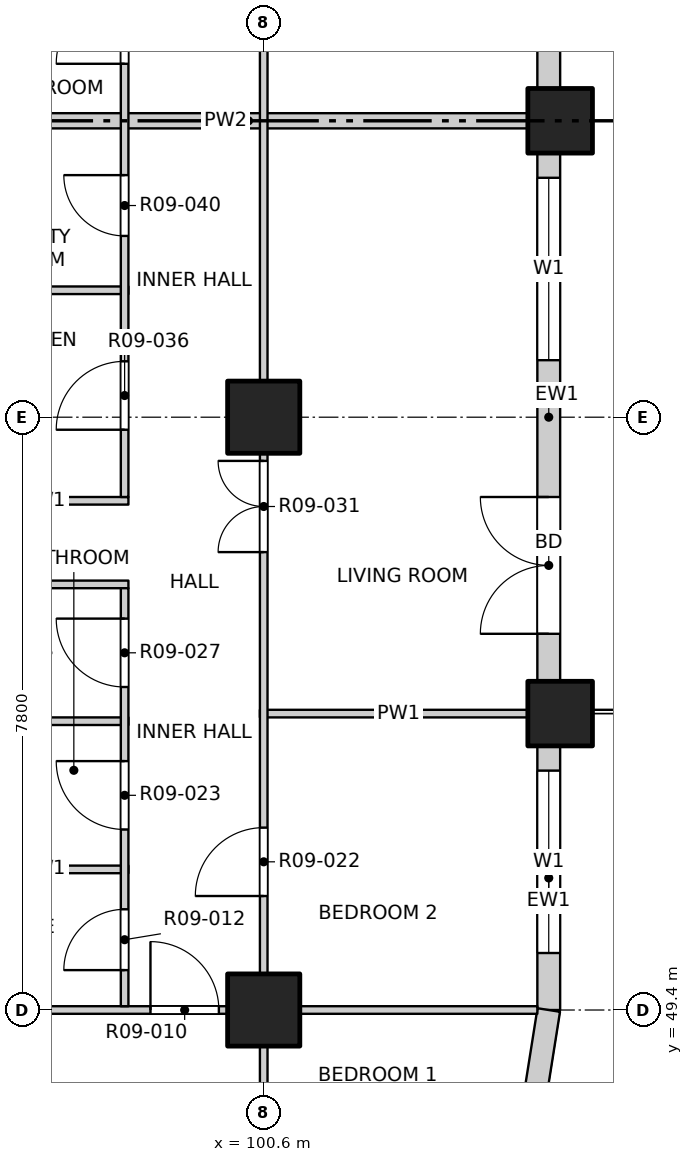
"""IFC4 building model, lengths in metres.
Left out: names, types, materials, properties, quantities, classifications, styles, units other than length and angle.
Written with IfcOpenShell. Run it as: python <this file> out.ifc"""

import sys

from ifc_helpers import new_model, si_unit, direction, frame, frame_2d, origin, origin_2d, place, context, subcontext, project, spatial, rectangle, extrude, element, fill, save


model = new_model("IFC4")
c1 = context("Model", 3, precision=1e-05, world=origin(), true_north=direction((0.0, 1.0)))
c2 = subcontext(c1, "Body", "Model", "MODEL_VIEW")
j1 = project(units=[si_unit("LENGTHUNIT", "METRE"), si_unit("PLANEANGLEUNIT", "RADIAN")], contexts=[c1])
p1 = place(None, origin())
s1 = spatial("IfcSite", under=j1, at=p1, CompositionType="ELEMENT")
p2 = place(p1, origin())
s2 = spatial("IfcBuilding", under=s1, at=p2, CompositionType="ELEMENT")
p3 = place(p2, frame((0.0, 0.0, 113.5)))
s3 = spatial("IfcBuildingStorey", under=s2, at=p3, CompositionType="ELEMENT", Elevation=113.5)
for number, where, z_axis, x_axis in (
    (1, (104.5, 53.3, -0.25), (0.0, 0.0, 1.0), (1.0, 0.0, 0.0)),
    (2, (104.5, 61.1, -0.25), (0.0, 0.0, 1.0), (1.0, 0.0, 0.0)),
):
    element("IfcColumn", number, at=place(p3, frame(where, z_axis=z_axis, x_axis=x_axis)), inside=s3, PredefinedType="COLUMN", context=c2, shape_type="SweptSolid", body=[
        extrude(rectangle(XDim=0.85, YDim=0.85, at=origin_2d()), origin(), (0.0, 0.0, 1.0), 3.35),
    ])
for number, where, z_axis, x_axis in (
    (3, (100.6, 49.4, -0.25), (0.0, 0.0, 1.0), (1.0, 0.0, 0.0)),
    (4, (100.6, 57.2, -0.25), (0.0, 0.0, 1.0), (1.0, 0.0, 0.0)),
):
    element("IfcColumn", number, at=place(p3, frame(where, z_axis=z_axis, x_axis=x_axis)), inside=s3, PredefinedType="COLUMN", context=c2, shape_type="SweptSolid", body=[
        extrude(rectangle(XDim=0.95, YDim=0.95, at=origin_2d()), origin(), (0.0, 0.0, 1.0), 3.35),
    ])
p4 = place(p3, frame((104.35, 49.4, 0.0), z_axis=(0.0, 0.0, 1.0), x_axis=(0.0, 1.0, 0.0)))
e5 = element("IfcWall", 5, at=p4, inside=s3, PredefinedType="SOLIDWALL", context=c2, shape_type="SweptSolid", body=[
    extrude(rectangle(XDim=3.475, YDim=0.3, at=frame_2d((1.738, 0.0))), origin(), (0.0, 0.0, 1.0), 3.1),
])
p5 = place(p4, frame((0.75, 0.0, 0.9)))
e6 = element("IfcOpeningElement", 6, at=p5, cuts=e5, PredefinedType="OPENING", context=c2, shape_type="SweptSolid", body=[
    extrude(rectangle(XDim=2.4, YDim=1.8, at=frame_2d((1.2, 0.9))), frame((0.0, 0.16, 0.0), z_axis=(0.0, -1.0, 0.0), x_axis=(1.0, 0.0, 0.0)), (0.0, 0.0, 1.0), 0.32),
])
p6 = place(p3, frame((104.35, 53.725, 0.0), z_axis=(0.0, 0.0, 1.0), x_axis=(0.0, 1.0, 0.0)))
e7 = element("IfcWall", 7, at=p6, inside=s3, PredefinedType="SOLIDWALL", context=c2, shape_type="SweptSolid", body=[
    extrude(rectangle(XDim=6.95, YDim=0.3, at=frame_2d((3.475, 0.0))), origin(), (0.0, 0.0, 1.0), 3.1),
])
p7 = place(p6, frame((0.625, 0.0, 0.0)))
e8 = element("IfcOpeningElement", 8, at=p7, cuts=e7, PredefinedType="OPENING", context=c2, shape_type="SweptSolid", body=[
    extrude(rectangle(XDim=1.8, YDim=2.4, at=frame_2d((0.9, 1.2))), frame((0.0, 0.16, 0.0), z_axis=(0.0, -1.0, 0.0), x_axis=(1.0, 0.0, 0.0)), (0.0, 0.0, 1.0), 0.32),
])
p8 = place(p6, frame((4.225, 0.0, 0.9)))
e9 = element("IfcOpeningElement", 9, at=p8, cuts=e7, PredefinedType="OPENING", context=c2, shape_type="SweptSolid", body=[
    extrude(rectangle(XDim=2.4, YDim=1.8, at=frame_2d((1.2, 0.9))), frame((0.0, 0.16, 0.0), z_axis=(0.0, -1.0, 0.0), x_axis=(1.0, 0.0, 0.0)), (0.0, 0.0, 1.0), 0.32),
])
p9 = place(p3, frame((104.35, 61.525, 0.0), z_axis=(0.0, 0.0, 1.0), x_axis=(0.0, 1.0, 0.0)))
e10 = element("IfcWall", 10, at=p9, inside=s3, PredefinedType="SOLIDWALL", context=c2, shape_type="SweptSolid", body=[
    extrude(rectangle(XDim=6.95, YDim=0.3, at=frame_2d((3.475, 0.0))), origin(), (0.0, 0.0, 1.0), 3.1),
])
p10 = place(p9, frame((0.625, 0.0, 0.0)))
e11 = element("IfcOpeningElement", 11, at=p10, cuts=e10, PredefinedType="OPENING", context=c2, shape_type="SweptSolid", body=[
    extrude(rectangle(XDim=1.8, YDim=2.4, at=frame_2d((0.9, 1.2))), frame((0.0, 0.16, 0.0), z_axis=(0.0, -1.0, 0.0), x_axis=(1.0, 0.0, 0.0)), (0.0, 0.0, 1.0), 0.32),
])
p11 = place(p9, frame((4.225, 0.0, 0.9)))
e12 = element("IfcOpeningElement", 12, at=p11, cuts=e10, PredefinedType="OPENING", context=c2, shape_type="SweptSolid", body=[
    extrude(rectangle(XDim=2.4, YDim=1.8, at=frame_2d((1.2, 0.9))), frame((0.0, 0.16, 0.0), z_axis=(0.0, -1.0, 0.0), x_axis=(1.0, 0.0, 0.0)), (0.0, 0.0, 1.0), 0.32),
])
p12 = place(p3, frame((104.167, 48.241, 0.0), z_axis=(0.0, 0.0, 1.0), x_axis=(0.156496880861, 0.987678452879, 0.0)))
e13 = element("IfcWall", 13, at=p12, inside=s3, PredefinedType="SOLIDWALL", context=c2, shape_type="SweptSolid", body=[
    extrude(rectangle(XDim=1.173, YDim=0.3, at=frame_2d((0.586, 0.0))), origin(), (0.0, 0.0, 1.0), 3.1),
])
p13 = place(p3, frame((65.8, 49.4, 0.0), z_axis=(0.0, 0.0, 1.0), x_axis=(1.0, 0.0, 0.0)))
e14 = element("IfcWall", 14, at=p13, inside=s3, PredefinedType="PARTITIONING", context=c2, shape_type="SweptSolid", body=[
    extrude(rectangle(XDim=38.4, YDim=0.1, at=frame_2d((19.2, 0.0))), origin(), (0.0, 0.0, 1.0), 3.1),
])
p14 = place(p13, frame((4.19, 0.0, 0.0)))
e15 = element("IfcOpeningElement", 15, at=p14, cuts=e14, PredefinedType="OPENING", context=c2, shape_type="SweptSolid", body=[
    extrude(rectangle(XDim=0.9, YDim=2.1, at=frame_2d((0.45, 1.05))), frame((0.0, 0.06, 0.0), z_axis=(0.0, -1.0, 0.0), x_axis=(1.0, 0.0, 0.0)), (0.0, 0.0, 1.0), 0.12),
])
p15 = place(p13, frame((9.0, 0.0, 0.0)))
e16 = element("IfcOpeningElement", 16, at=p15, cuts=e14, PredefinedType="OPENING", context=c2, shape_type="SweptSolid", body=[
    extrude(rectangle(XDim=0.9, YDim=2.1, at=frame_2d((0.45, 1.05))), frame((0.0, 0.06, 0.0), z_axis=(0.0, -1.0, 0.0), x_axis=(1.0, 0.0, 0.0)), (0.0, 0.0, 1.0), 0.12),
])
p16 = place(p13, frame((12.9, 0.0, 0.0)))
e17 = element("IfcOpeningElement", 17, at=p16, cuts=e14, PredefinedType="OPENING", context=c2, shape_type="SweptSolid", body=[
    extrude(rectangle(XDim=0.9, YDim=2.1, at=frame_2d((0.45, 1.05))), frame((0.0, 0.06, 0.0), z_axis=(0.0, -1.0, 0.0), x_axis=(1.0, 0.0, 0.0)), (0.0, 0.0, 1.0), 0.12),
])
p17 = place(p13, frame((16.8, 0.0, 0.0)))
e18 = element("IfcOpeningElement", 18, at=p17, cuts=e14, PredefinedType="OPENING", context=c2, shape_type="SweptSolid", body=[
    extrude(rectangle(XDim=0.9, YDim=2.1, at=frame_2d((0.45, 1.05))), frame((0.0, 0.06, 0.0), z_axis=(0.0, -1.0, 0.0), x_axis=(1.0, 0.0, 0.0)), (0.0, 0.0, 1.0), 0.12),
])
p18 = place(p13, frame((20.7, 0.0, 0.0)))
e19 = element("IfcOpeningElement", 19, at=p18, cuts=e14, PredefinedType="OPENING", context=c2, shape_type="SweptSolid", body=[
    extrude(rectangle(XDim=0.9, YDim=2.1, at=frame_2d((0.45, 1.05))), frame((0.0, 0.06, 0.0), z_axis=(0.0, -1.0, 0.0), x_axis=(1.0, 0.0, 0.0)), (0.0, 0.0, 1.0), 0.12),
])
p19 = place(p13, frame((24.6, 0.0, 0.0)))
e20 = element("IfcOpeningElement", 20, at=p19, cuts=e14, PredefinedType="OPENING", context=c2, shape_type="SweptSolid", body=[
    extrude(rectangle(XDim=0.9, YDim=2.1, at=frame_2d((0.45, 1.05))), frame((0.0, 0.06, 0.0), z_axis=(0.0, -1.0, 0.0), x_axis=(1.0, 0.0, 0.0)), (0.0, 0.0, 1.0), 0.12),
])
p20 = place(p13, frame((28.5, 0.0, 0.0)))
e21 = element("IfcOpeningElement", 21, at=p20, cuts=e14, PredefinedType="OPENING", context=c2, shape_type="SweptSolid", body=[
    extrude(rectangle(XDim=0.9, YDim=2.1, at=frame_2d((0.45, 1.05))), frame((0.0, 0.06, 0.0), z_axis=(0.0, -1.0, 0.0), x_axis=(1.0, 0.0, 0.0)), (0.0, 0.0, 1.0), 0.12),
])
p21 = place(p13, frame((33.31, 0.0, 0.0)))
e22 = element("IfcOpeningElement", 22, at=p21, cuts=e14, PredefinedType="OPENING", context=c2, shape_type="SweptSolid", body=[
    extrude(rectangle(XDim=0.9, YDim=2.1, at=frame_2d((0.45, 1.05))), frame((0.0, 0.06, 0.0), z_axis=(0.0, -1.0, 0.0), x_axis=(1.0, 0.0, 0.0)), (0.0, 0.0, 1.0), 0.12),
])
p22 = place(p3, frame((96.6, 51.25, 0.0), z_axis=(0.0, 0.0, 1.0), x_axis=(1.0, 0.0, 0.0)))
e23 = element("IfcWall", 23, at=p22, inside=s3, PredefinedType="PARTITIONING", context=c2, shape_type="SweptSolid", body=[
    extrude(rectangle(XDim=2.22, YDim=0.1, at=frame_2d((1.11, 0.0))), origin(), (0.0, 0.0, 1.0), 3.1),
])
p23 = place(p3, frame((96.8, 53.2, 0.0), z_axis=(0.0, 0.0, 1.0), x_axis=(1.0, 0.0, 0.0)))
e24 = element("IfcWall", 24, at=p23, inside=s3, PredefinedType="PARTITIONING", context=c2, shape_type="SweptSolid", body=[
    extrude(rectangle(XDim=2.02, YDim=0.1, at=frame_2d((1.01, 0.0))), origin(), (0.0, 0.0, 1.0), 3.1),
])
p24 = place(p3, frame((100.55, 53.3, 0.0), z_axis=(0.0, 0.0, 1.0), x_axis=(1.0, 0.0, 0.0)))
e25 = element("IfcWall", 25, at=p24, inside=s3, PredefinedType="PARTITIONING", context=c2, shape_type="SweptSolid", body=[
    extrude(rectangle(XDim=3.65, YDim=0.1, at=frame_2d((1.825, 0.0))), origin(), (0.0, 0.0, 1.0), 3.1),
])
for number, where, z_axis, x_axis in (
    (26, (96.6, 55.0, 0.0), (0.0, 0.0, 1.0), (1.0, 0.0, 0.0)),
    (27, (96.6, 56.1, 0.0), (0.0, 0.0, 1.0), (1.0, 0.0, 0.0)),
    (28, (96.6, 58.87, 0.0), (0.0, 0.0, 1.0), (1.0, 0.0, 0.0)),
):
    element("IfcWall", number, at=place(p3, frame(where, z_axis=z_axis, x_axis=x_axis)), inside=s3, PredefinedType="PARTITIONING", context=c2, shape_type="SweptSolid", body=[
        extrude(rectangle(XDim=2.22, YDim=0.1, at=frame_2d((1.11, 0.0))), origin(), (0.0, 0.0, 1.0), 3.1),
    ])
p25 = place(p3, frame((96.6, 61.1, 0.0), z_axis=(0.0, 0.0, 1.0), x_axis=(1.0, 0.0, 0.0)))
e29 = element("IfcWall", 29, at=p25, inside=s3, PredefinedType="PARTITIONING", context=c2, shape_type="SweptSolid", body=[
    extrude(rectangle(XDim=7.6, YDim=0.2, at=frame_2d((3.8, 0.0))), origin(), (0.0, 0.0, 1.0), 3.1),
])
p26 = place(p3, frame((98.77, 49.45, 0.0), z_axis=(0.0, 0.0, 1.0), x_axis=(0.0, 1.0, 0.0)))
e30 = element("IfcWall", 30, at=p26, inside=s3, PredefinedType="PARTITIONING", context=c2, shape_type="SweptSolid", body=[
    extrude(rectangle(XDim=5.5, YDim=0.1, at=frame_2d((2.75, 0.0))), origin(), (0.0, 0.0, 1.0), 3.1),
])
p27 = place(p26, frame((0.475, 0.0, 0.0)))
e31 = element("IfcOpeningElement", 31, at=p27, cuts=e30, PredefinedType="OPENING", context=c2, shape_type="SweptSolid", body=[
    extrude(rectangle(XDim=0.8, YDim=2.1, at=frame_2d((0.4, 1.05))), frame((0.0, 0.06, 0.0), z_axis=(0.0, -1.0, 0.0), x_axis=(1.0, 0.0, 0.0)), (0.0, 0.0, 1.0), 0.12),
])
p28 = place(p26, frame((2.325, 0.0, 0.0)))
e32 = element("IfcOpeningElement", 32, at=p28, cuts=e30, PredefinedType="OPENING", context=c2, shape_type="SweptSolid", body=[
    extrude(rectangle(XDim=0.9, YDim=2.1, at=frame_2d((0.45, 1.05))), frame((0.0, 0.06, 0.0), z_axis=(0.0, -1.0, 0.0), x_axis=(1.0, 0.0, 0.0)), (0.0, 0.0, 1.0), 0.12),
])
p29 = place(p26, frame((4.2, 0.0, 0.0)))
e33 = element("IfcOpeningElement", 33, at=p29, cuts=e30, PredefinedType="OPENING", context=c2, shape_type="SweptSolid", body=[
    extrude(rectangle(XDim=0.9, YDim=2.1, at=frame_2d((0.45, 1.05))), frame((0.0, 0.06, 0.0), z_axis=(0.0, -1.0, 0.0), x_axis=(1.0, 0.0, 0.0)), (0.0, 0.0, 1.0), 0.12),
])
p30 = place(p3, frame((98.77, 56.15, 0.0), z_axis=(0.0, 0.0, 1.0), x_axis=(0.0, 1.0, 0.0)))
e34 = element("IfcWall", 34, at=p30, inside=s3, PredefinedType="PARTITIONING", context=c2, shape_type="SweptSolid", body=[
    extrude(rectangle(XDim=10.7, YDim=0.1, at=frame_2d((5.35, 0.0))), origin(), (0.0, 0.0, 1.0), 3.1),
])
p31 = place(p30, frame((0.885, 0.0, 0.0)))
e35 = element("IfcOpeningElement", 35, at=p31, cuts=e34, PredefinedType="OPENING", context=c2, shape_type="SweptSolid", body=[
    extrude(rectangle(XDim=0.9, YDim=2.1, at=frame_2d((0.45, 1.05))), frame((0.0, 0.06, 0.0), z_axis=(0.0, -1.0, 0.0), x_axis=(1.0, 0.0, 0.0)), (0.0, 0.0, 1.0), 0.12),
])
p32 = place(p30, frame((3.435, 0.0, 0.0)))
e36 = element("IfcOpeningElement", 36, at=p32, cuts=e34, PredefinedType="OPENING", context=c2, shape_type="SweptSolid", body=[
    extrude(rectangle(XDim=0.8, YDim=2.1, at=frame_2d((0.4, 1.05))), frame((0.0, 0.06, 0.0), z_axis=(0.0, -1.0, 0.0), x_axis=(1.0, 0.0, 0.0)), (0.0, 0.0, 1.0), 0.12),
])
p33 = place(p30, frame((5.7, 0.0, 0.0)))
e37 = element("IfcOpeningElement", 37, at=p33, cuts=e34, PredefinedType="OPENING", context=c2, shape_type="SweptSolid", body=[
    extrude(rectangle(XDim=0.9, YDim=2.1, at=frame_2d((0.45, 1.05))), frame((0.0, 0.06, 0.0), z_axis=(0.0, -1.0, 0.0), x_axis=(1.0, 0.0, 0.0)), (0.0, 0.0, 1.0), 0.12),
])
p34 = place(p30, frame((8.6, 0.0, 0.0)))
e38 = element("IfcOpeningElement", 38, at=p34, cuts=e34, PredefinedType="OPENING", context=c2, shape_type="SweptSolid", body=[
    extrude(rectangle(XDim=0.9, YDim=2.1, at=frame_2d((0.45, 1.05))), frame((0.0, 0.06, 0.0), z_axis=(0.0, -1.0, 0.0), x_axis=(1.0, 0.0, 0.0)), (0.0, 0.0, 1.0), 0.12),
])
p35 = place(p3, frame((100.6, 45.8, 0.0), z_axis=(0.0, 0.0, 1.0), x_axis=(0.0, 1.0, 0.0)))
e39 = element("IfcWall", 39, at=p35, inside=s3, PredefinedType="PARTITIONING", context=c2, shape_type="SweptSolid", body=[
    extrude(rectangle(XDim=38.4, YDim=0.1, at=frame_2d((19.2, 0.0))), origin(), (0.0, 0.0, 1.0), 3.1),
])
p36 = place(p35, frame((1.05, 0.0, 0.0)))
e40 = element("IfcOpeningElement", 40, at=p36, cuts=e39, PredefinedType="OPENING", context=c2, shape_type="SweptSolid", body=[
    extrude(rectangle(XDim=1.2, YDim=2.1, at=frame_2d((0.6, 1.05))), frame((0.0, 0.06, 0.0), z_axis=(0.0, -1.0, 0.0), x_axis=(1.0, 0.0, 0.0)), (0.0, 0.0, 1.0), 0.12),
])
p37 = place(p35, frame((5.1, 0.0, 0.0)))
e41 = element("IfcOpeningElement", 41, at=p37, cuts=e39, PredefinedType="OPENING", context=c2, shape_type="SweptSolid", body=[
    extrude(rectangle(XDim=0.9, YDim=2.1, at=frame_2d((0.45, 1.05))), frame((0.0, 0.06, 0.0), z_axis=(0.0, -1.0, 0.0), x_axis=(1.0, 0.0, 0.0)), (0.0, 0.0, 1.0), 0.12),
])
p38 = place(p35, frame((9.625, 0.0, 0.0)))
e42 = element("IfcOpeningElement", 42, at=p38, cuts=e39, PredefinedType="OPENING", context=c2, shape_type="SweptSolid", body=[
    extrude(rectangle(XDim=1.2, YDim=2.1, at=frame_2d((0.6, 1.05))), frame((0.0, 0.06, 0.0), z_axis=(0.0, -1.0, 0.0), x_axis=(1.0, 0.0, 0.0)), (0.0, 0.0, 1.0), 0.12),
])
p39 = place(p35, frame((16.8, 0.0, 0.0)))
e43 = element("IfcOpeningElement", 43, at=p39, cuts=e39, PredefinedType="OPENING", context=c2, shape_type="SweptSolid", body=[
    extrude(rectangle(XDim=0.9, YDim=2.1, at=frame_2d((0.45, 1.05))), frame((0.0, 0.06, 0.0), z_axis=(0.0, -1.0, 0.0), x_axis=(1.0, 0.0, 0.0)), (0.0, 0.0, 1.0), 0.12),
])
p40 = place(p35, frame((20.7, 0.0, 0.0)))
e44 = element("IfcOpeningElement", 44, at=p40, cuts=e39, PredefinedType="OPENING", context=c2, shape_type="SweptSolid", body=[
    extrude(rectangle(XDim=0.9, YDim=2.1, at=frame_2d((0.45, 1.05))), frame((0.0, 0.06, 0.0), z_axis=(0.0, -1.0, 0.0), x_axis=(1.0, 0.0, 0.0)), (0.0, 0.0, 1.0), 0.12),
])
p41 = place(p35, frame((24.6, 0.0, 0.0)))
e45 = element("IfcOpeningElement", 45, at=p41, cuts=e39, PredefinedType="OPENING", context=c2, shape_type="SweptSolid", body=[
    extrude(rectangle(XDim=0.9, YDim=2.1, at=frame_2d((0.45, 1.05))), frame((0.0, 0.06, 0.0), z_axis=(0.0, -1.0, 0.0), x_axis=(1.0, 0.0, 0.0)), (0.0, 0.0, 1.0), 0.12),
])
p42 = place(p35, frame((28.5, 0.0, 0.0)))
e46 = element("IfcOpeningElement", 46, at=p42, cuts=e39, PredefinedType="OPENING", context=c2, shape_type="SweptSolid", body=[
    extrude(rectangle(XDim=0.9, YDim=2.1, at=frame_2d((0.45, 1.05))), frame((0.0, 0.06, 0.0), z_axis=(0.0, -1.0, 0.0), x_axis=(1.0, 0.0, 0.0)), (0.0, 0.0, 1.0), 0.12),
])
p43 = place(p35, frame((32.4, 0.0, 0.0)))
e47 = element("IfcOpeningElement", 47, at=p43, cuts=e39, PredefinedType="OPENING", context=c2, shape_type="SweptSolid", body=[
    extrude(rectangle(XDim=0.9, YDim=2.1, at=frame_2d((0.45, 1.05))), frame((0.0, 0.06, 0.0), z_axis=(0.0, -1.0, 0.0), x_axis=(1.0, 0.0, 0.0)), (0.0, 0.0, 1.0), 0.12),
])
p44 = place(p35, frame((36.15, 0.0, 0.0)))
e48 = element("IfcOpeningElement", 48, at=p44, cuts=e39, PredefinedType="OPENING", context=c2, shape_type="SweptSolid", body=[
    extrude(rectangle(XDim=1.2, YDim=2.1, at=frame_2d((0.6, 1.05))), frame((0.0, 0.06, 0.0), z_axis=(0.0, -1.0, 0.0), x_axis=(1.0, 0.0, 0.0)), (0.0, 0.0, 1.0), 0.12),
])
p45 = place(p5, origin())
e49 = element("IfcWindow", 49, at=p45, inside=s3, PartitioningType="DOUBLE_PANEL_VERTICAL", PredefinedType="WINDOW", context=c2, shape_type="SweptSolid", body=[
    extrude(rectangle(XDim=2.4, YDim=1.8, at=frame_2d((1.2, 0.9))), frame((0.0, 0.03, 0.0), z_axis=(0.0, -1.0, 0.0), x_axis=(1.0, 0.0, 0.0)), (0.0, 0.0, 1.0), 0.06),
])
fill(e6, e49)
p46 = place(p7, origin())
e50 = element("IfcDoor", 50, at=p46, inside=s3, OperationType="DOUBLE_DOOR_SINGLE_SWING", PredefinedType="DOOR", context=c2, shape_type="SweptSolid", body=[
    extrude(rectangle(XDim=1.8, YDim=2.4, at=frame_2d((0.9, 1.2))), frame((0.0, 0.025, 0.0), z_axis=(0.0, -1.0, 0.0), x_axis=(1.0, 0.0, 0.0)), (0.0, 0.0, 1.0), 0.05),
])
fill(e8, e50)
p47 = place(p8, origin())
e51 = element("IfcWindow", 51, at=p47, inside=s3, PartitioningType="DOUBLE_PANEL_VERTICAL", PredefinedType="WINDOW", context=c2, shape_type="SweptSolid", body=[
    extrude(rectangle(XDim=2.4, YDim=1.8, at=frame_2d((1.2, 0.9))), frame((0.0, 0.03, 0.0), z_axis=(0.0, -1.0, 0.0), x_axis=(1.0, 0.0, 0.0)), (0.0, 0.0, 1.0), 0.06),
])
fill(e9, e51)
p48 = place(p21, origin())
e52 = element("IfcDoor", 52, at=p48, inside=s3, OperationType="SINGLE_SWING_LEFT", PredefinedType="DOOR", context=c2, shape_type="SweptSolid", body=[
    extrude(rectangle(XDim=0.9, YDim=2.1, at=frame_2d((0.45, 1.05))), frame((0.0, 0.025, 0.0), z_axis=(0.0, -1.0, 0.0), x_axis=(1.0, 0.0, 0.0)), (0.0, 0.0, 1.0), 0.05),
])
fill(e22, e52)
p49 = place(p27, origin())
e53 = element("IfcDoor", 53, at=p49, inside=s3, OperationType="SINGLE_SWING_LEFT", PredefinedType="DOOR", context=c2, shape_type="SweptSolid", body=[
    extrude(rectangle(XDim=0.8, YDim=2.1, at=frame_2d((0.4, 1.05))), frame((0.0, 0.025, 0.0), z_axis=(0.0, -1.0, 0.0), x_axis=(1.0, 0.0, 0.0)), (0.0, 0.0, 1.0), 0.05),
])
fill(e31, e53)
p50 = place(p37, origin())
e54 = element("IfcDoor", 54, at=p50, inside=s3, OperationType="SINGLE_SWING_LEFT", PredefinedType="DOOR", context=c2, shape_type="SweptSolid", body=[
    extrude(rectangle(XDim=0.9, YDim=2.1, at=frame_2d((0.45, 1.05))), frame((0.0, 0.025, 0.0), z_axis=(0.0, -1.0, 0.0), x_axis=(1.0, 0.0, 0.0)), (0.0, 0.0, 1.0), 0.05),
])
fill(e41, e54)
p51 = place(p28, origin())
e55 = element("IfcDoor", 55, at=p51, inside=s3, OperationType="SINGLE_SWING_RIGHT", PredefinedType="DOOR", context=c2, shape_type="SweptSolid", body=[
    extrude(rectangle(XDim=0.9, YDim=2.1, at=frame_2d((0.45, 1.05))), frame((0.0, 0.025, 0.0), z_axis=(0.0, -1.0, 0.0), x_axis=(1.0, 0.0, 0.0)), (0.0, 0.0, 1.0), 0.05),
])
fill(e32, e55)
p52 = place(p29, origin())
e56 = element("IfcDoor", 56, at=p52, inside=s3, OperationType="SINGLE_SWING_RIGHT", PredefinedType="DOOR", context=c2, shape_type="SweptSolid", body=[
    extrude(rectangle(XDim=0.9, YDim=2.1, at=frame_2d((0.45, 1.05))), frame((0.0, 0.025, 0.0), z_axis=(0.0, -1.0, 0.0), x_axis=(1.0, 0.0, 0.0)), (0.0, 0.0, 1.0), 0.05),
])
fill(e33, e56)
p53 = place(p38, origin())
e57 = element("IfcDoor", 57, at=p53, inside=s3, OperationType="DOUBLE_DOOR_SINGLE_SWING", PredefinedType="DOOR", context=c2, shape_type="SweptSolid", body=[
    extrude(rectangle(XDim=1.2, YDim=2.1, at=frame_2d((0.6, 1.05))), frame((0.0, 0.025, 0.0), z_axis=(0.0, -1.0, 0.0), x_axis=(1.0, 0.0, 0.0)), (0.0, 0.0, 1.0), 0.05),
])
fill(e42, e57)
p54 = place(p31, origin())
e58 = element("IfcDoor", 58, at=p54, inside=s3, OperationType="SINGLE_SWING_LEFT", PredefinedType="DOOR", context=c2, shape_type="SweptSolid", body=[
    extrude(rectangle(XDim=0.9, YDim=2.1, at=frame_2d((0.45, 1.05))), frame((0.0, 0.025, 0.0), z_axis=(0.0, -1.0, 0.0), x_axis=(1.0, 0.0, 0.0)), (0.0, 0.0, 1.0), 0.05),
])
fill(e35, e58)
p55 = place(p32, origin())
e59 = element("IfcDoor", 59, at=p55, inside=s3, OperationType="SINGLE_SWING_RIGHT", PredefinedType="DOOR", context=c2, shape_type="SweptSolid", body=[
    extrude(rectangle(XDim=0.8, YDim=2.1, at=frame_2d((0.4, 1.05))), frame((0.0, 0.025, 0.0), z_axis=(0.0, -1.0, 0.0), x_axis=(1.0, 0.0, 0.0)), (0.0, 0.0, 1.0), 0.05),
])
fill(e36, e59)
p56 = place(p33, origin())
e60 = element("IfcDoor", 60, at=p56, inside=s3, OperationType="SINGLE_SWING_LEFT", PredefinedType="DOOR", context=c2, shape_type="SweptSolid", body=[
    extrude(rectangle(XDim=0.9, YDim=2.1, at=frame_2d((0.45, 1.05))), frame((0.0, 0.025, 0.0), z_axis=(0.0, -1.0, 0.0), x_axis=(1.0, 0.0, 0.0)), (0.0, 0.0, 1.0), 0.05),
])
fill(e37, e60)
save(model, sys.argv[1])
